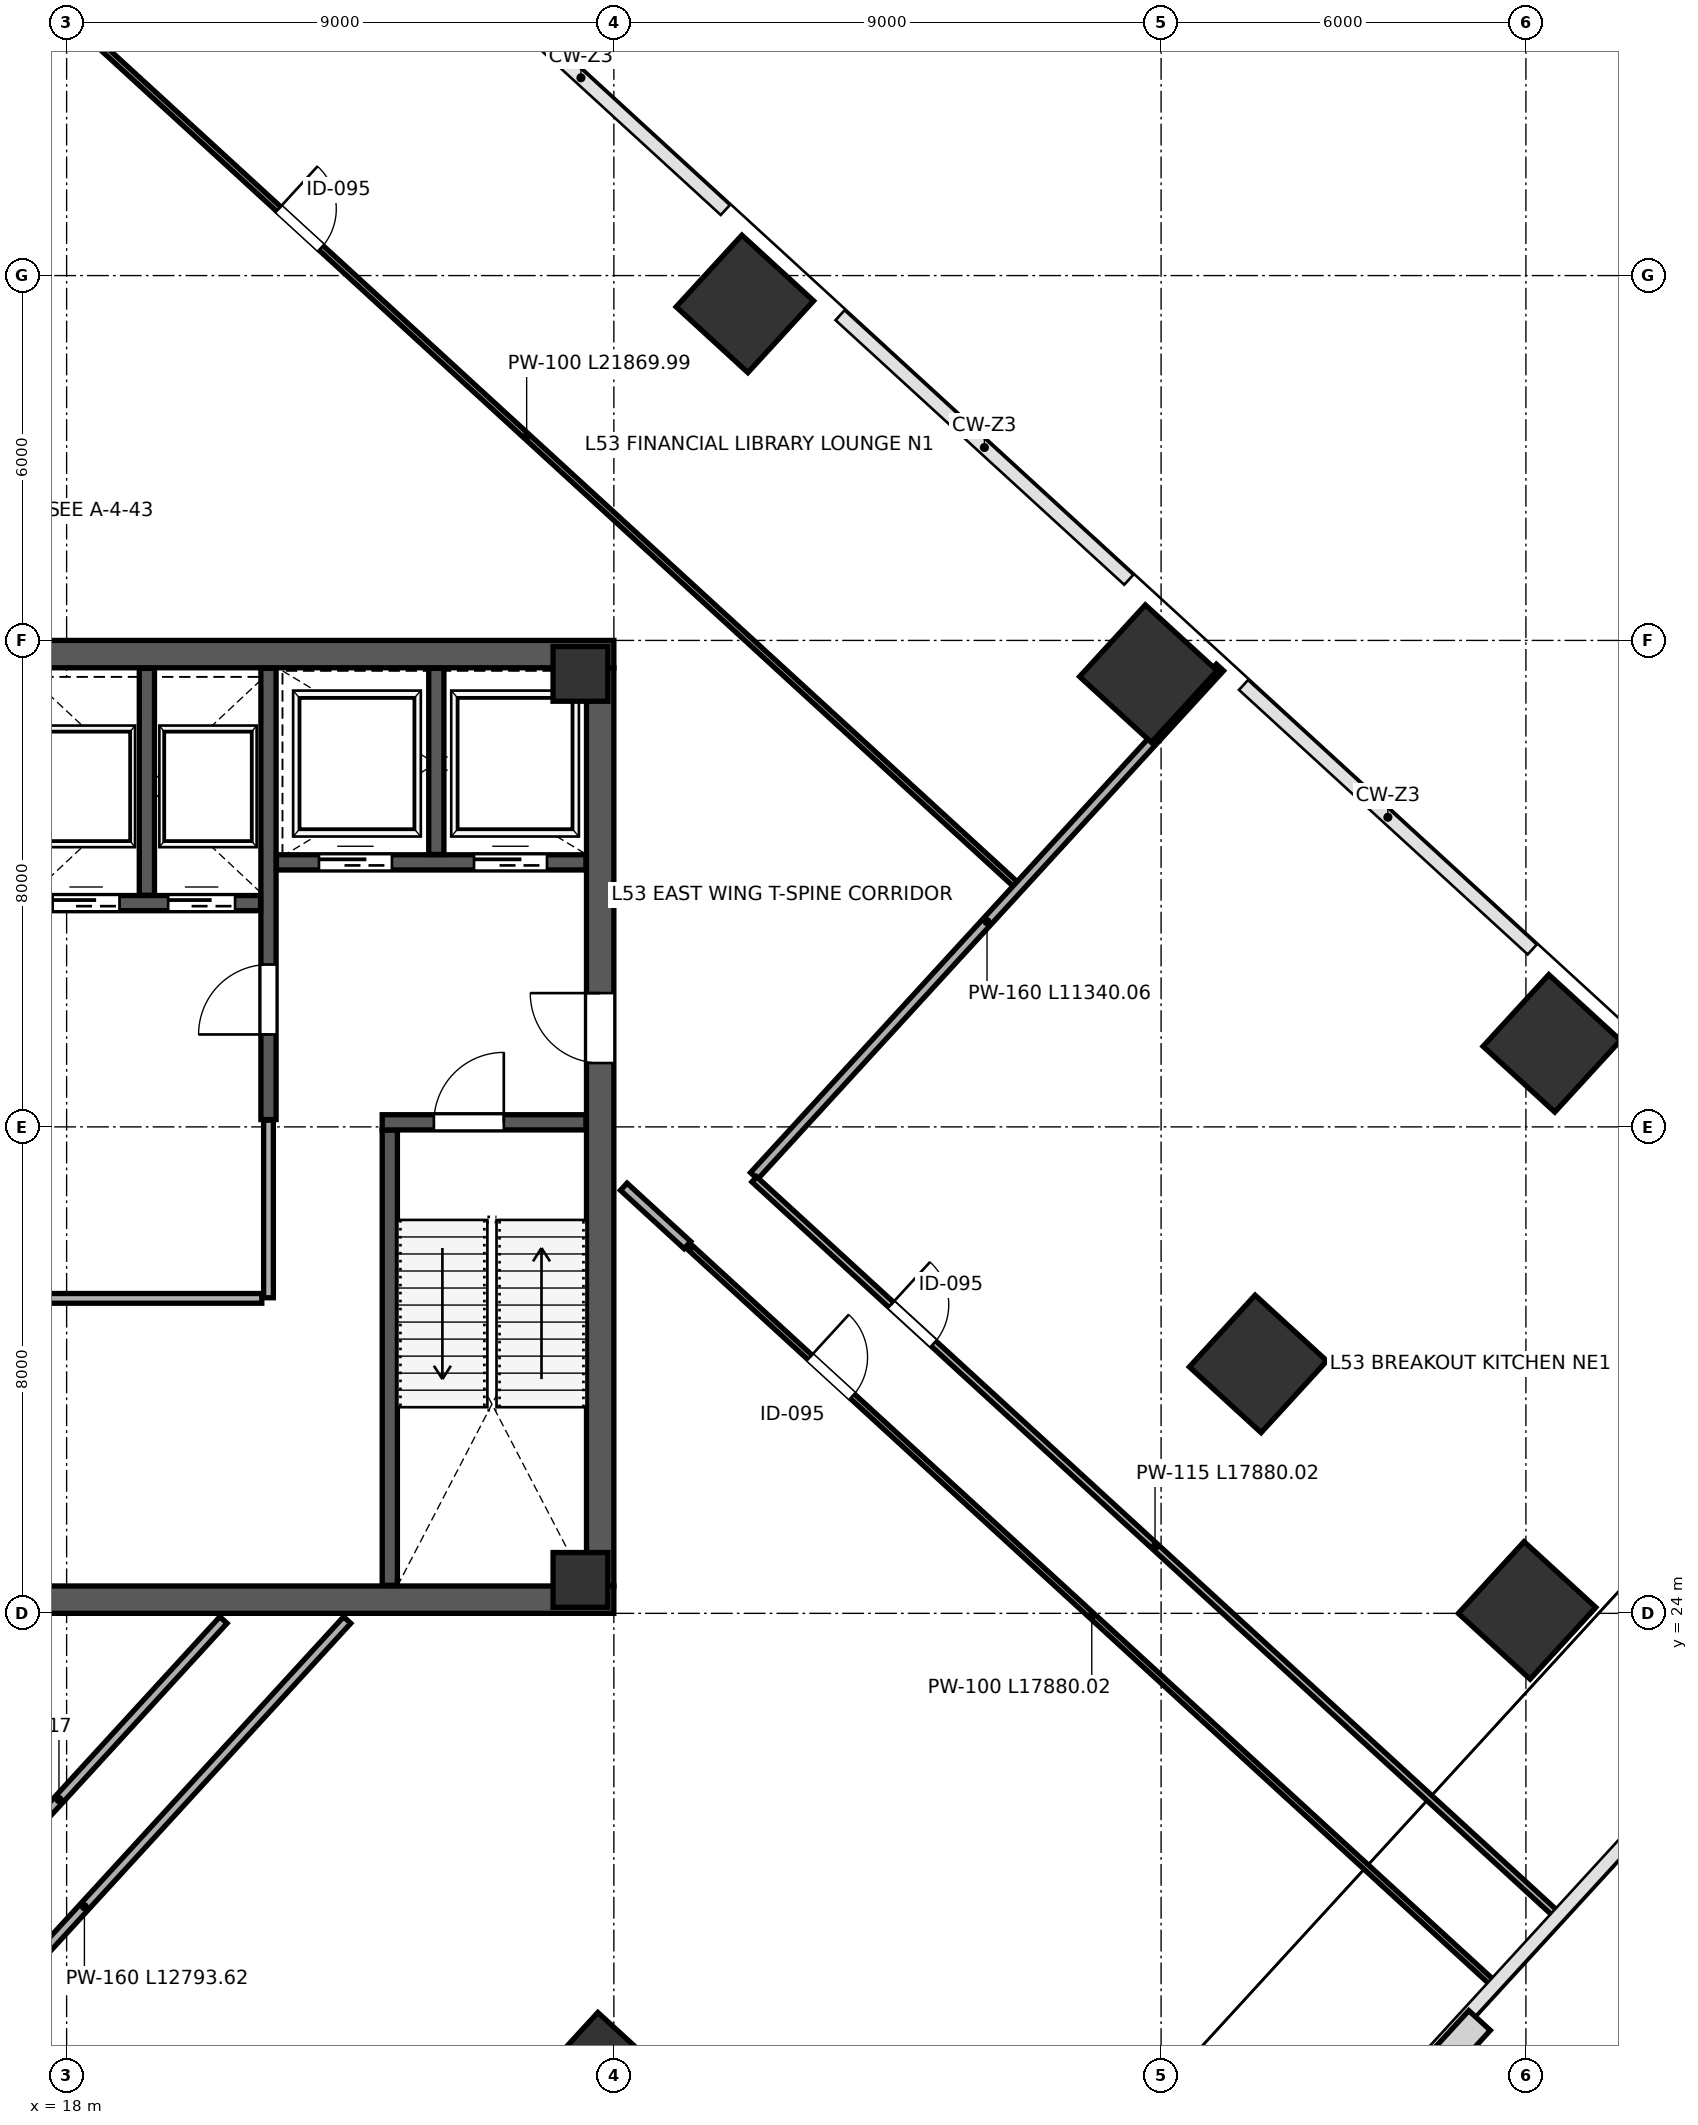
"""IFC4 building model, lengths in metres.
Left out: names, types, materials, properties, quantities, classifications, styles, units other than length and angle.
Written with IfcOpenShell. Run it as: python <this file> out.ifc"""

import sys

from ifc_helpers import new_model, si_unit, direction, frame, frame_2d, origin, origin_2d, place, context, subcontext, project, spatial, rectangle, extrude, source, transform, mapped, element, fill, save


model = new_model("IFC4")
c1 = context("Model", 3, precision=1e-05, world=origin(), true_north=direction((0.0, 1.0)))
c2 = subcontext(c1, "Body", "Model", "MODEL_VIEW")
j1 = project(units=[si_unit("LENGTHUNIT", "METRE"), si_unit("PLANEANGLEUNIT", "RADIAN")], contexts=[c1])
p1 = place(None, origin())
s1 = spatial("IfcSite", under=j1, at=p1, CompositionType="ELEMENT")
p2 = place(p1, origin())
s2 = spatial("IfcBuilding", under=s1, at=p2, CompositionType="ELEMENT")
p3 = place(p2, frame((0.0, 0.0, 237.4)))
s3 = spatial("IfcBuildingStorey", under=s2, at=p3, CompositionType="ELEMENT", Elevation=237.4)
m1 = source(origin(), c2, "Body", "SweptSolid", [
    extrude(rectangle(XDim=0.9, YDim=0.9, at=origin_2d()), origin(), (0.0, 0.0, 1.0), 4.199),
])
for number, where, z_axis, x_axis in (
    (1, (26.45, 24.55, 0.001), (0.0, 0.0, 1.0), (1.0, 0.0, 0.0)),
    (2, (26.45, 39.45, 0.001), (0.0, 0.0, 1.0), (1.0, 0.0, 0.0)),
):
    element("IfcColumn", number, at=place(p3, frame(where, z_axis=z_axis, x_axis=x_axis)), inside=s3, PredefinedType="COLUMN", context=c2, shape_type="MappedRepresentation", body=[
        mapped(m1, transform((0.0, 0.0, 0.0), scale=1.0)),
    ])
m2 = source(origin(), c2, "Body", "SweptSolid", [
    extrude(rectangle(XDim=1.6, YDim=1.6, at=origin_2d()), origin(), (0.0, 0.0, 1.0), 4.199),
])
for number, where, z_axis, x_axis in (
    (3, (29.155, 45.534, 0.001), (0.0, 0.0, 1.0), (-0.737, 0.676, 0.0)),
    (4, (35.79, 39.454, 0.001), (0.0, 0.0, 1.0), (-0.737, 0.676, 0.0)),
):
    element("IfcColumn", number, at=place(p3, frame(where, z_axis=z_axis, x_axis=x_axis)), inside=s3, PredefinedType="COLUMN", context=c2, shape_type="MappedRepresentation", body=[
        mapped(m2, transform((0.0, 0.0, 0.0), scale=1.0)),
    ])
m3 = source(origin(), c2, "Body", "SweptSolid", [
    extrude(rectangle(XDim=1.6, YDim=1.6, at=origin_2d()), origin(), (0.0, 0.0, 1.0), 4.199),
])
for number, where, z_axis, x_axis in (
    (5, (26.786, 16.306, 0.001), (0.0, 0.0, 1.0), (-0.737, 0.676, 0.0)),
    (6, (37.595, 28.102, 0.001), (0.0, 0.0, 1.0), (-0.737, 0.676, 0.0)),
):
    element("IfcColumn", number, at=place(p3, frame(where, z_axis=z_axis, x_axis=x_axis)), inside=s3, PredefinedType="COLUMN", context=c2, shape_type="MappedRepresentation", body=[
        mapped(m3, transform((0.0, 0.0, 0.0), scale=1.0)),
    ])
for number, where, z_axis, x_axis in (
    (7, (42.426, 33.374, 0.001), (0.0, 0.0, 1.0), (-0.737, 0.676, 0.0)),
    (8, (42.019, 24.049, 0.001), (0.0, 0.0, 1.0), (-0.737, 0.676, 0.0)),
):
    element("IfcColumn", number, at=place(p3, frame(where, z_axis=z_axis, x_axis=x_axis)), inside=s3, PredefinedType="COLUMN", context=c2, shape_type="MappedRepresentation", body=[
        mapped(m2, transform((0.0, 0.0, 0.0), scale=1.0)),
    ])
p4 = place(p3, frame((26.775, 24.45, 0.0), z_axis=(0.0, 0.0, 1.0), x_axis=(0.0, 1.0, 0.0)))
e9 = element("IfcWall", 9, at=p4, inside=s3, PredefinedType="SHEAR", context=c2, shape_type="SweptSolid", body=[
    extrude(rectangle(XDim=15.1, YDim=0.45, at=frame_2d((7.55, 0.0))), origin(), (0.0, 0.0, 1.0), 3.96),
])
p5 = place(p4, frame((8.6, 0.0, 0.0)))
e10 = element("IfcOpeningElement", 10, at=p5, cuts=e9, PredefinedType="OPENING", context=c2, shape_type="SweptSolid", body=[
    extrude(rectangle(XDim=1.15, YDim=2.2, at=frame_2d((0.575, 1.1))), frame((0.0, 0.235, 0.0), z_axis=(0.0, -1.0, 0.0), x_axis=(1.0, 0.0, 0.0)), (0.0, 0.0, 1.0), 0.47),
])
for number, where, z_axis, x_axis in (
    (11, (9.0, 24.225, 0.0), (0.0, 0.0, 1.0), (1.0, 0.0, 0.0)),
    (12, (9.0, 39.775, 0.0), (0.0, 0.0, 1.0), (1.0, 0.0, 0.0)),
):
    element("IfcWall", number, at=place(p3, frame(where, z_axis=z_axis, x_axis=x_axis)), inside=s3, PredefinedType="SHEAR", context=c2, shape_type="SweptSolid", body=[
        extrude(rectangle(XDim=18.0, YDim=0.45, at=frame_2d((9.0, 0.0))), origin(), (0.0, 0.0, 1.0), 3.96),
    ])
p6 = place(p3, frame((23.315, 24.46, 0.0), z_axis=(0.0, 0.0, 1.0), x_axis=(0.0, 1.0, 0.0)))
e13 = element("IfcWall", 13, at=p6, inside=s3, PredefinedType="SHEAR", context=c2, shape_type="SweptSolid", body=[
    extrude(rectangle(XDim=7.49, YDim=0.25, at=frame_2d((3.745, 0.0))), origin(), (0.0, 0.0, 1.0), 3.96),
])
p7 = place(p3, frame((23.19, 32.075, 0.0), z_axis=(0.0, 0.0, 1.0), x_axis=(1.0, 0.0, 0.0)))
e14 = element("IfcWall", 14, at=p7, inside=s3, PredefinedType="SHEAR", context=c2, shape_type="SweptSolid", body=[
    extrude(rectangle(XDim=3.35, YDim=0.25, at=frame_2d((1.675, 0.0))), origin(), (0.0, 0.0, 1.0), 3.96),
])
p8 = place(p7, frame((0.85, 0.0, 0.0)))
e15 = element("IfcOpeningElement", 15, at=p8, cuts=e14, PredefinedType="OPENING", context=c2, shape_type="SweptSolid", body=[
    extrude(rectangle(XDim=1.15, YDim=2.2, at=frame_2d((0.575, 1.1))), frame((0.0, 0.135, 0.0), z_axis=(0.0, -1.0, 0.0), x_axis=(1.0, 0.0, 0.0)), (0.0, 0.0, 1.0), 0.27),
])
p9 = place(p3, frame((21.32, 32.12, 0.0), z_axis=(0.0, 0.0, 1.0), x_axis=(0.0, 1.0, 0.0)))
e16 = element("IfcWall", 16, at=p9, inside=s3, PredefinedType="SHEAR", context=c2, shape_type="SweptSolid", body=[
    extrude(rectangle(XDim=7.42, YDim=0.25, at=frame_2d((3.71, 0.0))), origin(), (0.0, 0.0, 1.0), 3.96),
])
p10 = place(p9, frame((1.4, 0.0, 0.0)))
e17 = element("IfcOpeningElement", 17, at=p10, cuts=e16, PredefinedType="OPENING", context=c2, shape_type="SweptSolid", body=[
    extrude(rectangle(XDim=1.15, YDim=2.2, at=frame_2d((0.575, 1.1))), frame((0.0, 0.135, 0.0), z_axis=(0.0, -1.0, 0.0), x_axis=(1.0, 0.0, 0.0)), (0.0, 0.0, 1.0), 0.27),
])
p11 = place(p3, frame((21.45, 36.35, 0.0), z_axis=(0.0, 0.0, 1.0), x_axis=(1.0, 0.0, 0.0)))
e18 = element("IfcWall", 18, at=p11, inside=s3, PredefinedType="SHEAR", context=c2, shape_type="SweptSolid", body=[
    extrude(rectangle(XDim=5.09, YDim=0.25, at=frame_2d((2.545, 0.0))), origin(), (0.0, 0.0, 1.0), 3.96),
])
p12 = place(p11, frame((0.7, 0.0, 0.0)))
e19 = element("IfcOpeningElement", 19, at=p12, cuts=e18, PredefinedType="OPENING", context=c2, shape_type="SweptSolid", body=[
    extrude(rectangle(XDim=1.2, YDim=2.2, at=frame_2d((0.6, 1.1))), frame((0.0, 0.135, 0.0), z_axis=(0.0, -1.0, 0.0), x_axis=(1.0, 0.0, 0.0)), (0.0, 0.0, 1.0), 0.27),
])
p13 = place(p11, frame((3.25, 0.0, 0.0)))
e20 = element("IfcOpeningElement", 20, at=p13, cuts=e18, PredefinedType="OPENING", context=c2, shape_type="SweptSolid", body=[
    extrude(rectangle(XDim=1.2, YDim=2.2, at=frame_2d((0.6, 1.1))), frame((0.0, 0.135, 0.0), z_axis=(0.0, -1.0, 0.0), x_axis=(1.0, 0.0, 0.0)), (0.0, 0.0, 1.0), 0.27),
])
p14 = place(p3, frame((24.08, 36.48, 0.0), z_axis=(0.0, 0.0, 1.0), x_axis=(0.0, 1.0, 0.0)))
e21 = element("IfcWall", 21, at=p14, inside=s3, PredefinedType="SHEAR", context=c2, shape_type="SweptSolid", body=[
    extrude(rectangle(XDim=3.06, YDim=0.25, at=frame_2d((1.53, 0.0))), origin(), (0.0, 0.0, 1.0), 3.96),
])
p15 = place(p3, frame((17.32, 35.68, 0.0), z_axis=(0.0, 0.0, 1.0), x_axis=(1.0, 0.0, 0.0)))
e22 = element("IfcWall", 22, at=p15, inside=s3, PredefinedType="SHEAR", context=c2, shape_type="SweptSolid", body=[
    extrude(rectangle(XDim=3.87, YDim=0.25, at=frame_2d((1.935, 0.0))), origin(), (0.0, 0.0, 1.0), 3.96),
])
p16 = place(p15, frame((0.45, 0.0, 0.0)))
e23 = element("IfcOpeningElement", 23, at=p16, cuts=e22, PredefinedType="OPENING", context=c2, shape_type="SweptSolid", body=[
    extrude(rectangle(XDim=1.1, YDim=2.2, at=frame_2d((0.55, 1.1))), frame((0.0, 0.135, 0.0), z_axis=(0.0, -1.0, 0.0), x_axis=(1.0, 0.0, 0.0)), (0.0, 0.0, 1.0), 0.27),
])
p17 = place(p15, frame((2.35, 0.0, 0.0)))
e24 = element("IfcOpeningElement", 24, at=p17, cuts=e22, PredefinedType="OPENING", context=c2, shape_type="SweptSolid", body=[
    extrude(rectangle(XDim=1.1, YDim=2.2, at=frame_2d((0.55, 1.1))), frame((0.0, 0.135, 0.0), z_axis=(0.0, -1.0, 0.0), x_axis=(1.0, 0.0, 0.0)), (0.0, 0.0, 1.0), 0.27),
])
p18 = place(p3, frame((19.32, 35.81, 0.0), z_axis=(0.0, 0.0, 1.0), x_axis=(0.0, 1.0, 0.0)))
e25 = element("IfcWall", 25, at=p18, inside=s3, PredefinedType="SHEAR", context=c2, shape_type="SweptSolid", body=[
    extrude(rectangle(XDim=3.73, YDim=0.25, at=frame_2d((1.865, 0.0))), origin(), (0.0, 0.0, 1.0), 3.96),
])
p19 = place(p3, frame((12.84, 29.18, 0.0), z_axis=(0.0, 0.0, 1.0), x_axis=(1.0, 0.0, 0.0)))
e26 = element("IfcWall", 26, at=p19, inside=s3, PredefinedType="PARTITIONING", context=c2, shape_type="SweptSolid", body=[
    extrude(rectangle(XDim=8.37, YDim=0.16, at=frame_2d((4.185, 0.0))), origin(), (0.0, 0.0, 1.0), 3.96),
])
p20 = place(p19, frame((2.6, 0.0, 0.0)))
e27 = element("IfcOpeningElement", 27, at=p20, cuts=e26, PredefinedType="OPENING", context=c2, shape_type="SweptSolid", body=[
    extrude(rectangle(XDim=0.9, YDim=2.15, at=frame_2d((0.45, 1.075))), frame((0.0, 0.09, 0.0), z_axis=(0.0, -1.0, 0.0), x_axis=(1.0, 0.0, 0.0)), (0.0, 0.0, 1.0), 0.18),
])
p21 = place(p3, frame((21.32, 29.19, 0.0), z_axis=(0.0, 0.0, 1.0), x_axis=(0.0, 1.0, 0.0)))
e28 = element("IfcWall", 28, at=p21, inside=s3, PredefinedType="PARTITIONING", context=c2, shape_type="SweptSolid", body=[
    extrude(rectangle(XDim=2.92, YDim=0.16, at=frame_2d((1.46, 0.0))), origin(), (0.0, 0.0, 1.0), 3.96),
])
p22 = place(p3, frame((15.168, 17.986, 0.0), z_axis=(0.0, 0.0, 1.0), x_axis=(0.675616954369, 0.737252827034, 0.0)))
e29 = element("IfcWall", 29, at=p22, inside=s3, PredefinedType="PARTITIONING", context=c2, shape_type="SweptSolid", body=[
    extrude(rectangle(XDim=8.009, YDim=0.16, at=frame_2d((4.005, 0.0))), origin(), (0.0, 0.0, 1.0), 3.96),
])
p23 = place(p3, frame((27.163, 31.016, 0.0), z_axis=(0.0, 0.0, 1.0), x_axis=(0.737296869908, -0.675568890361, 0.0)))
e30 = element("IfcWall", 30, at=p23, inside=s3, PredefinedType="PARTITIONING", context=c2, shape_type="SweptSolid", body=[
    extrude(rectangle(XDim=1.42, YDim=0.16, at=frame_2d((0.71, 0.0))), origin(), (0.0, 0.0, 1.0), 3.96),
])
p24 = place(p3, frame((17.504, 50.744, 0.0), z_axis=(0.0, 0.0, 1.0), x_axis=(0.737277850523, -0.675589646996, 0.0)))
e31 = element("IfcWall", 31, at=p24, inside=s3, PredefinedType="PARTITIONING", context=c2, shape_type="SweptSolid", body=[
    extrude(rectangle(XDim=21.87, YDim=0.1, at=frame_2d((10.935, 0.0))), origin(), (0.0, 0.0, 1.0), 3.96),
])
p25 = place(p24, frame((5.4, 0.0, 0.0)))
e32 = element("IfcOpeningElement", 32, at=p25, cuts=e31, PredefinedType="OPENING", context=c2, shape_type="SweptSolid", body=[
    extrude(rectangle(XDim=0.95, YDim=2.15, at=frame_2d((0.475, 1.075))), frame((0.0, 0.06, 0.0), z_axis=(0.0, -1.0, 0.0), x_axis=(1.0, 0.0, 0.0)), (0.0, 0.0, 1.0), 0.12),
])
p26 = place(p3, frame((1.73, 32.85, 0.0), z_axis=(0.0, 0.0, 1.0), x_axis=(0.675589845589, 0.737277668546, 0.0)))
e33 = element("IfcWall", 33, at=p26, inside=s3, PredefinedType="PARTITIONING", context=c2, shape_type="SweptSolid", body=[
    extrude(rectangle(XDim=26.742, YDim=0.115, at=frame_2d((13.371, 0.0))), origin(), (0.0, 0.0, 1.0), 3.96),
])
p27 = place(p3, frame((29.307, 31.194, 0.0), z_axis=(0.0, 0.0, 1.0), x_axis=(0.67558228032, 0.73728460076, 0.0)))
e34 = element("IfcWall", 34, at=p27, inside=s3, PredefinedType="PARTITIONING", context=c2, shape_type="SweptSolid", body=[
    extrude(rectangle(XDim=11.34, YDim=0.16, at=frame_2d((5.67, 0.0))), origin(), (0.0, 0.0, 1.0), 3.195),
])
p28 = place(p3, frame((13.971, 14.458, 0.0), z_axis=(0.0, 0.0, 1.0), x_axis=(0.675595861889, 0.737272155583, 0.0)))
e35 = element("IfcWall", 35, at=p28, inside=s3, PredefinedType="PARTITIONING", context=c2, shape_type="SweptSolid", body=[
    extrude(rectangle(XDim=12.794, YDim=0.16, at=frame_2d((6.397, 0.0))), origin(), (0.0, 0.0, 1.0), 3.96),
])
p29 = place(p3, frame((29.309, 31.138, 0.0), z_axis=(0.0, 0.0, 1.0), x_axis=(0.737278819957, -0.675588589041, 0.0)))
e36 = element("IfcWall", 36, at=p29, inside=s3, PredefinedType="PARTITIONING", context=c2, shape_type="SweptSolid", body=[
    extrude(rectangle(XDim=17.88, YDim=0.115, at=frame_2d((8.94, 0.0))), origin(), (0.0, 0.0, 1.0), 3.96),
])
p30 = place(p29, frame((3.05, 0.0, 0.0)))
e37 = element("IfcOpeningElement", 37, at=p30, cuts=e36, PredefinedType="OPENING", context=c2, shape_type="SweptSolid", body=[
    extrude(rectangle(XDim=0.95, YDim=2.15, at=frame_2d((0.475, 1.075))), frame((0.0, 0.067, 0.0), z_axis=(0.0, -1.0, 0.0), x_axis=(1.0, 0.0, 0.0)), (0.0, 0.0, 1.0), 0.135),
])
p31 = place(p3, frame((28.269, 30.002, 0.0), z_axis=(0.0, 0.0, 1.0), x_axis=(0.737272587758, -0.67559539026, 0.0)))
e38 = element("IfcWall", 38, at=p31, inside=s3, PredefinedType="PARTITIONING", context=c2, shape_type="SweptSolid", body=[
    extrude(rectangle(XDim=17.88, YDim=0.1, at=frame_2d((8.94, 0.0))), origin(), (0.0, 0.0, 1.0), 3.96),
])
p32 = place(p31, frame((2.65, 0.0, 0.0)))
e39 = element("IfcOpeningElement", 39, at=p32, cuts=e38, PredefinedType="OPENING", context=c2, shape_type="SweptSolid", body=[
    extrude(rectangle(XDim=0.95, YDim=2.15, at=frame_2d((0.475, 1.075))), frame((0.0, 0.06, 0.0), z_axis=(0.0, -1.0, 0.0), x_axis=(1.0, 0.0, 0.0)), (0.0, 0.0, 1.0), 0.12),
])
m4 = source(origin(), c2, "Body", "SweptSolid", [
    extrude(rectangle(XDim=1.15, YDim=2.2, at=frame_2d((0.575, 1.1))), frame((0.0, 0.025, 0.0), z_axis=(0.0, -1.0, 0.0), x_axis=(1.0, 0.0, 0.0)), (0.0, 0.0, 1.0), 0.05),
])
p33 = place(p10, origin())
e40 = element("IfcDoor", 40, at=p33, inside=s3, OperationType="SINGLE_SWING_LEFT", PredefinedType="DOOR", context=c2, shape_type="MappedRepresentation", body=[
    mapped(m4, transform((0.0, 0.0, 0.0), scale=1.0)),
])
fill(e17, e40)
m5 = source(origin(), c2, "Body", "SweptSolid", [
    extrude(rectangle(XDim=1.15, YDim=2.2, at=frame_2d((0.575, 1.1))), frame((0.0, 0.025, 0.0), z_axis=(0.0, -1.0, 0.0), x_axis=(1.0, 0.0, 0.0)), (0.0, 0.0, 1.0), 0.05),
])
p34 = place(p8, origin())
e41 = element("IfcDoor", 41, at=p34, inside=s3, OperationType="SINGLE_SWING_RIGHT", PredefinedType="DOOR", context=c2, shape_type="MappedRepresentation", body=[
    mapped(m5, transform((0.0, 0.0, 0.0), scale=1.0)),
])
fill(e15, e41)
p35 = place(p5, origin())
e42 = element("IfcDoor", 42, at=p35, inside=s3, OperationType="SINGLE_SWING_RIGHT", PredefinedType="DOOR", context=c2, shape_type="MappedRepresentation", body=[
    mapped(m4, transform((0.0, 0.0, 0.0), scale=1.0)),
])
fill(e10, e42)
m6 = source(origin(), c2, "Body", "SweptSolid", [
    extrude(rectangle(XDim=1.1, YDim=2.2, at=frame_2d((0.55, 1.1))), frame((0.0, 0.025, 0.0), z_axis=(0.0, -1.0, 0.0), x_axis=(1.0, 0.0, 0.0)), (0.0, 0.0, 1.0), 0.05),
])
p36 = place(p16, origin())
e43 = element("IfcDoor", 43, at=p36, inside=s3, OperationType="SLIDING_TO_LEFT", PredefinedType="DOOR", context=c2, shape_type="MappedRepresentation", body=[
    mapped(m6, transform((0.0, 0.0, 0.0), scale=1.0)),
])
fill(e23, e43)
p37 = place(p17, origin())
e44 = element("IfcDoor", 44, at=p37, inside=s3, OperationType="SLIDING_TO_RIGHT", PredefinedType="DOOR", context=c2, shape_type="MappedRepresentation", body=[
    mapped(m6, transform((0.0, 0.0, 0.0), scale=1.0)),
])
fill(e24, e44)
m7 = source(origin(), c2, "Body", "SweptSolid", [
    extrude(rectangle(XDim=1.2, YDim=2.2, at=frame_2d((0.6, 1.1))), frame((0.0, 0.025, 0.0), z_axis=(0.0, -1.0, 0.0), x_axis=(1.0, 0.0, 0.0)), (0.0, 0.0, 1.0), 0.05),
])
p38 = place(p12, origin())
e45 = element("IfcDoor", 45, at=p38, inside=s3, OperationType="SLIDING_TO_LEFT", PredefinedType="DOOR", context=c2, shape_type="MappedRepresentation", body=[
    mapped(m7, transform((0.0, 0.0, 0.0), scale=1.0)),
])
fill(e19, e45)
p39 = place(p13, origin())
e46 = element("IfcDoor", 46, at=p39, inside=s3, OperationType="SLIDING_TO_RIGHT", PredefinedType="DOOR", context=c2, shape_type="MappedRepresentation", body=[
    mapped(m7, transform((0.0, 0.0, 0.0), scale=1.0)),
])
fill(e20, e46)
m8 = source(origin(), c2, "Body", "SweptSolid", [
    extrude(rectangle(XDim=0.95, YDim=2.15, at=frame_2d((0.475, 1.075))), frame((0.0, 0.025, 0.0), z_axis=(0.0, -1.0, 0.0), x_axis=(1.0, 0.0, 0.0)), (0.0, 0.0, 1.0), 0.05),
])
p40 = place(p25, origin())
e47 = element("IfcDoor", 47, at=p40, inside=s3, OperationType="SINGLE_SWING_LEFT", PredefinedType="DOOR", context=c2, shape_type="MappedRepresentation", body=[
    mapped(m8, transform((0.0, 0.0, 0.0), scale=1.0)),
])
fill(e32, e47)
p41 = place(p30, origin())
e48 = element("IfcDoor", 48, at=p41, inside=s3, OperationType="SINGLE_SWING_LEFT", PredefinedType="DOOR", context=c2, shape_type="MappedRepresentation", body=[
    mapped(m8, transform((0.0, 0.0, 0.0), scale=1.0)),
])
fill(e37, e48)
p42 = place(p32, origin())
e49 = element("IfcDoor", 49, at=p42, inside=s3, OperationType="SINGLE_SWING_LEFT", PredefinedType="DOOR", context=c2, shape_type="MappedRepresentation", body=[
    mapped(m8, transform((0.0, 0.0, 0.0), scale=1.0)),
])
fill(e39, e49)
save(model, sys.argv[1])
